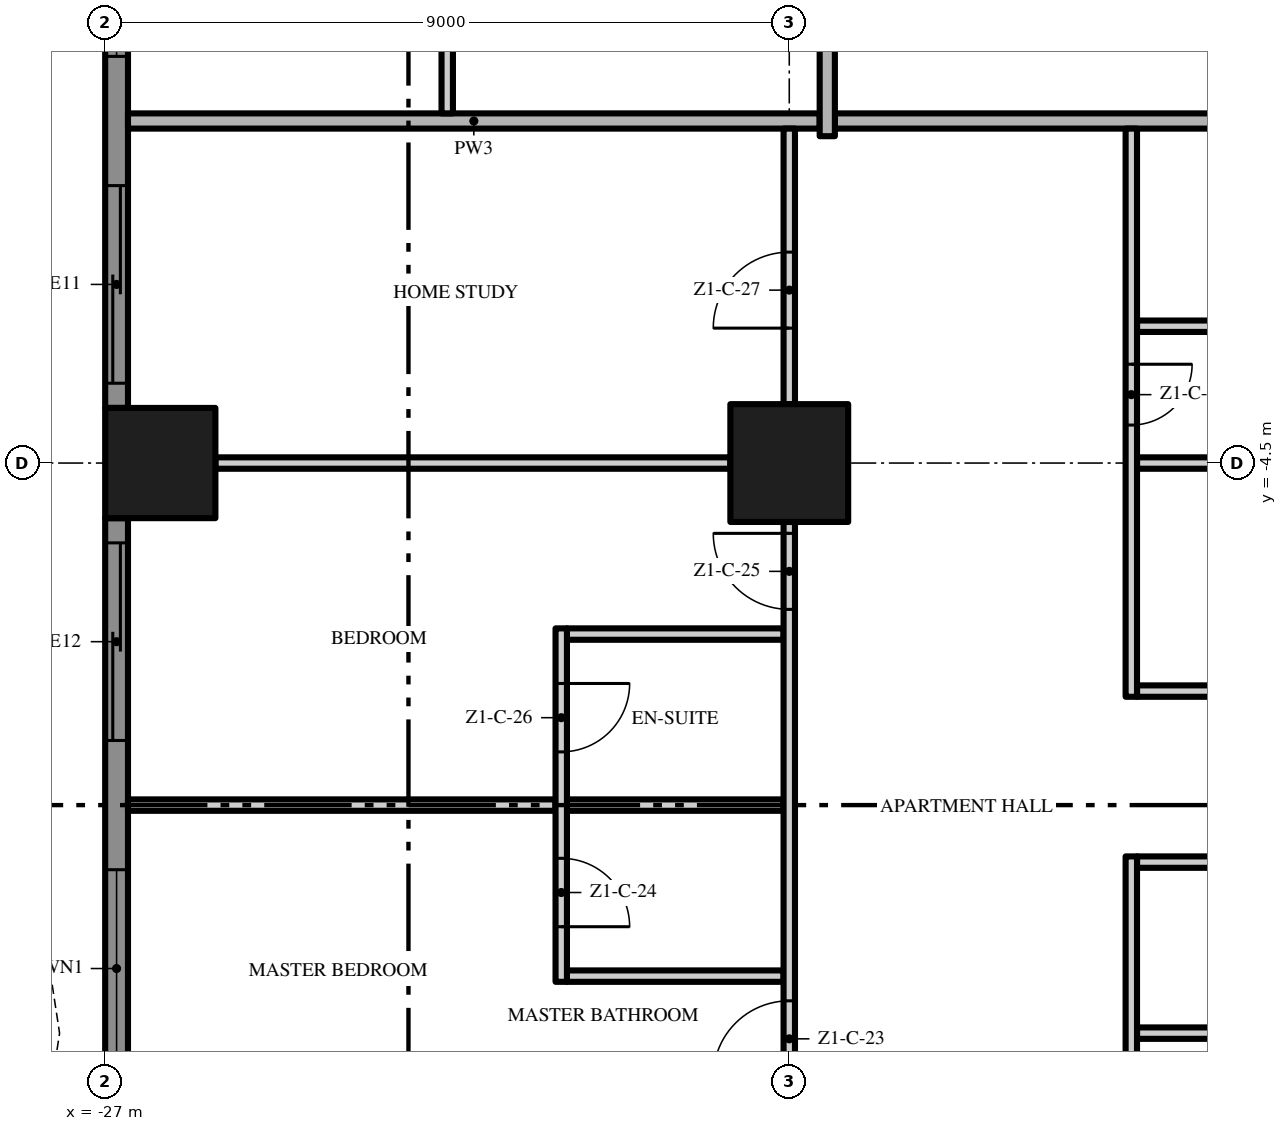
"""IFC4 building model, lengths in metres.
Left out: names, types, materials, properties, quantities, classifications, styles, units other than length and angle.
Written with IfcOpenShell. Run it as: python <this file> out.ifc"""

import sys

from ifc_helpers import new_model, si_unit, direction, frame, frame_2d, origin, origin_2d, place, context, subcontext, project, spatial, polyline, rectangle, outline, extrude, element, fill, save


model = new_model("IFC4")
c1 = context("Model", 3, precision=1e-05, world=origin(), true_north=direction((0.0, 1.0)))
c2 = subcontext(c1, "Body", "Model", "MODEL_VIEW")
j1 = project(units=[si_unit("LENGTHUNIT", "METRE"), si_unit("PLANEANGLEUNIT", "RADIAN")], contexts=[c1])
p1 = place(None, origin())
s1 = spatial("IfcSite", under=j1, at=p1, CompositionType="ELEMENT")
p2 = place(p1, origin())
s2 = spatial("IfcBuilding", under=s1, at=p2, CompositionType="ELEMENT")
p3 = place(p2, frame((0.0, 0.0, 37.8)))
s3 = spatial("IfcBuildingStorey", under=s2, at=p3, CompositionType="ELEMENT", Elevation=37.8)
p4 = place(p3, frame((-18.0, -4.5, 0.0), z_axis=(0.0, 0.0, 1.0), x_axis=(1.0, 0.0, 0.0)))
e1 = element("IfcColumn", 1, at=p4, inside=s3, PredefinedType="COLUMN", context=c2, shape_type="SweptSolid", body=[
    extrude(rectangle(XDim=1.55, YDim=1.55, at=origin_2d()), origin(), (0.0, 0.0, 1.0), 3.5),
])
p5 = place(p3, frame((-26.275, -4.5, 0.0), z_axis=(0.0, 0.0, 1.0), x_axis=(1.0, 0.0, 0.0)))
e2 = element("IfcColumn", 2, at=p5, inside=s3, PredefinedType="COLUMN", context=c2, shape_type="SweptSolid", body=[
    extrude(rectangle(XDim=1.45, YDim=1.45, at=origin_2d()), origin(), (0.0, 0.0, 1.0), 3.5),
])
p6 = place(p3, frame((-26.85, -3.775, 0.0), z_axis=(0.0, 0.0, 1.0), x_axis=(0.0, 1.0, 0.0)))
e3 = element("IfcWall", 3, at=p6, inside=s3, PredefinedType="SOLIDWALL", context=c2, shape_type="SweptSolid", body=[
    extrude(rectangle(XDim=7.55, YDim=0.3, at=frame_2d((3.775, 0.0))), origin(), (0.0, 0.0, 1.0), 3.5),
])
p7 = place(p6, frame((4.625, 0.0, 0.45)))
e4 = element("IfcOpeningElement", 4, at=p7, cuts=e3, PredefinedType="OPENING", context=c2, shape_type="SweptSolid", body=[
    extrude(rectangle(XDim=2.6, YDim=2.65, at=frame_2d((1.3, 1.325))), frame((0.0, 0.16, 0.0), z_axis=(0.0, -1.0, 0.0), x_axis=(1.0, 0.0, 0.0)), (0.0, 0.0, 1.0), 0.32),
])
p8 = place(p6, frame((0.325, 0.0, 0.0)))
e5 = element("IfcOpeningElement", 5, at=p8, cuts=e3, PredefinedType="OPENING", context=c2, shape_type="SweptSolid", body=[
    extrude(rectangle(XDim=2.6, YDim=2.4, at=frame_2d((1.3, 1.2))), frame((0.0, 0.16, 0.0), z_axis=(0.0, -1.0, 0.0), x_axis=(1.0, 0.0, 0.0)), (0.0, 0.0, 1.0), 0.32),
])
p9 = place(p3, frame((-26.85, -12.775, 0.0), z_axis=(0.0, 0.0, 1.0), x_axis=(0.0, 1.0, 0.0)))
e6 = element("IfcWall", 6, at=p9, inside=s3, PredefinedType="SOLIDWALL", context=c2, shape_type="SweptSolid", body=[
    extrude(rectangle(XDim=7.55, YDim=0.3, at=frame_2d((3.775, 0.0))), origin(), (0.0, 0.0, 1.0), 3.5),
])
p10 = place(p9, frame((4.625, 0.0, 0.0)))
e7 = element("IfcOpeningElement", 7, at=p10, cuts=e6, PredefinedType="OPENING", context=c2, shape_type="SweptSolid", body=[
    extrude(rectangle(XDim=2.6, YDim=2.4, at=frame_2d((1.3, 1.2))), frame((0.0, 0.16, 0.0), z_axis=(0.0, -1.0, 0.0), x_axis=(1.0, 0.0, 0.0)), (0.0, 0.0, 1.0), 0.32),
])
p11 = place(p9, frame((0.325, 0.0, 0.45)))
e8 = element("IfcOpeningElement", 8, at=p11, cuts=e6, PredefinedType="OPENING", context=c2, shape_type="SweptSolid", body=[
    extrude(rectangle(XDim=2.6, YDim=2.65, at=frame_2d((1.3, 1.325))), frame((0.0, 0.16, 0.0), z_axis=(0.0, -1.0, 0.0), x_axis=(1.0, 0.0, 0.0)), (0.0, 0.0, 1.0), 0.32),
])
p12 = place(p3, origin())
e9 = element("IfcWall", 9, at=p12, inside=s3, PredefinedType="USERDEFINED", context=c2, shape_type="SweptSolid", body=[
    extrude(outline(polyline([(-27.6, 18.0), (-27.829, 16.5), (-28.429, 15.0), (-29.171, 13.5), (-29.771, 12.0), (-30.0, 10.5), (-29.771, 9.0), (-29.171, 7.5), (-28.429, 6.0), (-27.829, 4.5), (-27.6, 3.0), (-27.829, 1.5), (-28.429, 0.0), (-29.171, -1.5), (-29.771, -3.0), (-30.0, -4.5), (-29.771, -6.0), (-29.171, -7.5), (-28.429, -9.0), (-27.829, -10.5), (-27.6, -12.0), (-27.829, -13.5), (-28.429, -15.0), (-29.171, -16.5), (-29.771, -18.0), (-29.539, -18.093), (-28.942, -16.602), (-28.201, -15.102), (-27.586, -13.566), (-27.347, -12.0), (-27.586, -10.434), (-28.201, -8.898), (-28.942, -7.398), (-29.528, -5.934), (-29.747, -4.5), (-29.528, -3.066), (-28.942, -1.602), (-28.201, -0.102), (-27.586, 1.434), (-27.347, 3.0), (-27.586, 4.566), (-28.201, 6.102), (-28.942, 7.602), (-29.528, 9.066), (-29.747, 10.5), (-29.528, 11.934), (-28.942, 13.398), (-28.201, 14.898), (-27.586, 16.434), (-27.353, 17.962), (-27.6, 18.0)])), origin(), (0.0, 0.0, 1.0), 0.9),
])
p13 = place(p3, frame((-13.425, -12.0, 0.0), z_axis=(0.0, 0.0, 1.0), x_axis=(1.0, 0.0, 0.0)))
e10 = element("IfcWall", 10, at=p13, inside=s3, PredefinedType="PARTITIONING", context=c2, shape_type="SweptSolid", body=[
    extrude(rectangle(XDim=4.35, YDim=0.15, at=frame_2d((2.175, 0.0))), origin(), (0.0, 0.0, 1.0), 3.5),
])
p14 = place(p3, frame((-20.925, -11.25, 0.0), z_axis=(0.0, 0.0, 1.0), x_axis=(1.0, 0.0, 0.0)))
e11 = element("IfcWall", 11, at=p14, inside=s3, PredefinedType="PARTITIONING", context=c2, shape_type="SweptSolid", body=[
    extrude(rectangle(XDim=2.85, YDim=0.15, at=frame_2d((1.425, 0.0))), origin(), (0.0, 0.0, 1.0), 3.5),
])
p15 = place(p3, frame((-9.075, -9.75, 0.0), z_axis=(0.0, 0.0, 1.0), x_axis=(-1.0, 0.0, 0.0)))
e12 = element("IfcWall", 12, at=p15, inside=s3, PredefinedType="PARTITIONING", context=c2, shape_type="SweptSolid", body=[
    extrude(rectangle(XDim=4.35, YDim=0.15, at=frame_2d((2.175, 0.0))), origin(), (0.0, 0.0, 1.0), 3.5),
])
p16 = place(p15, frame((1.7, 0.0, 0.0)))
e13 = element("IfcOpeningElement", 13, at=p16, cuts=e12, PredefinedType="OPENING", context=c2, shape_type="SweptSolid", body=[
    extrude(rectangle(XDim=0.9, YDim=2.1, at=frame_2d((0.45, 1.05))), frame((0.0, 0.085, 0.0), z_axis=(0.0, -1.0, 0.0), x_axis=(1.0, 0.0, 0.0)), (0.0, 0.0, 1.0), 0.17),
])
p17 = place(p3, frame((-26.7, -9.0, 0.0), z_axis=(0.0, 0.0, 1.0), x_axis=(1.0, 0.0, 0.0)))
e14 = element("IfcWall", 14, at=p17, inside=s3, PredefinedType="PARTITIONING", context=c2, shape_type="SweptSolid", body=[
    extrude(rectangle(XDim=5.625, YDim=0.15, at=frame_2d((2.812, 0.0))), origin(), (0.0, 0.0, 1.0), 3.5),
])
p18 = place(p3, frame((-20.925, -9.0, 0.0), z_axis=(0.0, 0.0, 1.0), x_axis=(1.0, 0.0, 0.0)))
e15 = element("IfcWall", 15, at=p18, inside=s3, PredefinedType="PARTITIONING", context=c2, shape_type="SweptSolid", body=[
    extrude(rectangle(XDim=2.85, YDim=0.15, at=frame_2d((1.425, 0.0))), origin(), (0.0, 0.0, 1.0), 3.5),
])
p19 = place(p3, frame((-13.425, -7.5, 0.0), z_axis=(0.0, 0.0, 1.0), x_axis=(1.0, 0.0, 0.0)))
e16 = element("IfcWall", 16, at=p19, inside=s3, PredefinedType="PARTITIONING", context=c2, shape_type="SweptSolid", body=[
    extrude(rectangle(XDim=4.35, YDim=0.15, at=frame_2d((2.175, 0.0))), origin(), (0.0, 0.0, 1.0), 3.5),
])
p20 = place(p3, frame((-20.925, -6.75, 0.0), z_axis=(0.0, 0.0, 1.0), x_axis=(1.0, 0.0, 0.0)))
e17 = element("IfcWall", 17, at=p20, inside=s3, PredefinedType="PARTITIONING", context=c2, shape_type="SweptSolid", body=[
    extrude(rectangle(XDim=2.85, YDim=0.15, at=frame_2d((1.425, 0.0))), origin(), (0.0, 0.0, 1.0), 3.5),
])
p21 = place(p3, frame((-25.55, -4.5, 0.0), z_axis=(0.0, 0.0, 1.0), x_axis=(1.0, 0.0, 0.0)))
e18 = element("IfcWall", 18, at=p21, inside=s3, PredefinedType="PARTITIONING", context=c2, shape_type="SweptSolid", body=[
    extrude(rectangle(XDim=6.775, YDim=0.15, at=frame_2d((3.388, 0.0))), origin(), (0.0, 0.0, 1.0), 3.5),
])
p22 = place(p3, frame((-13.425, -4.5, 0.0), z_axis=(0.0, 0.0, 1.0), x_axis=(1.0, 0.0, 0.0)))
e19 = element("IfcWall", 19, at=p22, inside=s3, PredefinedType="PARTITIONING", context=c2, shape_type="SweptSolid", body=[
    extrude(rectangle(XDim=3.65, YDim=0.15, at=frame_2d((1.825, 0.0))), origin(), (0.0, 0.0, 1.0), 3.5),
])
p23 = place(p3, frame((-13.425, -2.7, 0.0), z_axis=(0.0, 0.0, 1.0), x_axis=(1.0, 0.0, 0.0)))
e20 = element("IfcWall", 20, at=p23, inside=s3, PredefinedType="PARTITIONING", context=c2, shape_type="SweptSolid", body=[
    extrude(rectangle(XDim=4.35, YDim=0.15, at=frame_2d((2.175, 0.0))), origin(), (0.0, 0.0, 1.0), 3.5),
])
p24 = place(p3, frame((-17.4, 0.0, 0.0), z_axis=(0.0, 0.0, 1.0), x_axis=(1.0, 0.0, 0.0)))
e21 = element("IfcWall", 21, at=p24, inside=s3, PredefinedType="PARTITIONING", context=c2, shape_type="SweptSolid", body=[
    extrude(rectangle(XDim=12.8, YDim=0.2, at=frame_2d((6.4, 0.0))), origin(), (0.0, 0.0, 1.0), 3.5),
])
p25 = place(p3, frame((-26.7, 0.0, 0.0), z_axis=(0.0, 0.0, 1.0), x_axis=(1.0, 0.0, 0.0)))
e22 = element("IfcWall", 22, at=p25, inside=s3, PredefinedType="PARTITIONING", context=c2, shape_type="SweptSolid", body=[
    extrude(rectangle(XDim=9.1, YDim=0.2, at=frame_2d((4.55, 0.0))), origin(), (0.0, 0.0, 1.0), 3.5),
])
p26 = place(p3, frame((-22.5, 0.1, 0.0), z_axis=(0.0, 0.0, 1.0), x_axis=(0.0, 1.0, 0.0)))
e23 = element("IfcWall", 23, at=p26, inside=s3, PredefinedType="PARTITIONING", context=c2, shape_type="SweptSolid", body=[
    extrude(rectangle(XDim=17.175, YDim=0.15, at=frame_2d((8.588, 0.0))), origin(), (0.0, 0.0, 1.0), 3.5),
])
p27 = place(p26, frame((1.65, 0.0, 0.0)))
e24 = element("IfcOpeningElement", 24, at=p27, cuts=e23, PredefinedType="OPENING", context=c2, shape_type="SweptSolid", body=[
    extrude(rectangle(XDim=1.0, YDim=2.4, at=frame_2d((0.5, 1.2))), frame((0.0, 0.085, 0.0), z_axis=(0.0, -1.0, 0.0), x_axis=(1.0, 0.0, 0.0)), (0.0, 0.0, 1.0), 0.17),
])
p28 = place(p26, frame((8.0, 0.0, 0.0)))
e25 = element("IfcOpeningElement", 25, at=p28, cuts=e23, PredefinedType="OPENING", context=c2, shape_type="SweptSolid", body=[
    extrude(rectangle(XDim=1.8, YDim=2.4, at=frame_2d((0.9, 1.2))), frame((0.0, 0.085, 0.0), z_axis=(0.0, -1.0, 0.0), x_axis=(1.0, 0.0, 0.0)), (0.0, 0.0, 1.0), 0.17),
])
p29 = place(p26, frame((16.025, 0.0, 0.0)))
e26 = element("IfcOpeningElement", 26, at=p29, cuts=e23, PredefinedType="OPENING", context=c2, shape_type="SweptSolid", body=[
    extrude(rectangle(XDim=1.0, YDim=2.4, at=frame_2d((0.5, 1.2))), frame((0.0, 0.085, 0.0), z_axis=(0.0, -1.0, 0.0), x_axis=(1.0, 0.0, 0.0)), (0.0, 0.0, 1.0), 0.17),
])
p30 = place(p3, frame((-21.0, -6.675, 0.0), z_axis=(0.0, 0.0, 1.0), x_axis=(0.0, -1.0, 0.0)))
e27 = element("IfcWall", 27, at=p30, inside=s3, PredefinedType="PARTITIONING", context=c2, shape_type="SweptSolid", body=[
    extrude(rectangle(XDim=4.65, YDim=0.15, at=frame_2d((2.325, 0.0))), origin(), (0.0, 0.0, 1.0), 3.5),
])
p31 = place(p30, frame((3.025, 0.0, 0.0)))
e28 = element("IfcOpeningElement", 28, at=p31, cuts=e27, PredefinedType="OPENING", context=c2, shape_type="SweptSolid", body=[
    extrude(rectangle(XDim=0.9, YDim=2.1, at=frame_2d((0.45, 1.05))), frame((0.0, 0.085, 0.0), z_axis=(0.0, -1.0, 0.0), x_axis=(1.0, 0.0, 0.0)), (0.0, 0.0, 1.0), 0.17),
])
p32 = place(p30, frame((0.725, 0.0, 0.0)))
e29 = element("IfcOpeningElement", 29, at=p32, cuts=e27, PredefinedType="OPENING", context=c2, shape_type="SweptSolid", body=[
    extrude(rectangle(XDim=0.9, YDim=2.1, at=frame_2d((0.45, 1.05))), frame((0.0, 0.085, 0.0), z_axis=(0.0, -1.0, 0.0), x_axis=(1.0, 0.0, 0.0)), (0.0, 0.0, 1.0), 0.17),
])
p33 = place(p3, frame((-18.0, -12.725, 0.0), z_axis=(0.0, 0.0, 1.0), x_axis=(0.0, 1.0, 0.0)))
e30 = element("IfcWall", 30, at=p33, inside=s3, PredefinedType="PARTITIONING", context=c2, shape_type="SweptSolid", body=[
    extrude(rectangle(XDim=7.45, YDim=0.15, at=frame_2d((3.725, 0.0))), origin(), (0.0, 0.0, 1.0), 3.5),
])
p34 = place(p33, frame((0.15, 0.0, 0.0)))
e31 = element("IfcOpeningElement", 31, at=p34, cuts=e30, PredefinedType="OPENING", context=c2, shape_type="SweptSolid", body=[
    extrude(rectangle(XDim=1.0, YDim=2.4, at=frame_2d((0.5, 1.2))), frame((0.0, 0.085, 0.0), z_axis=(0.0, -1.0, 0.0), x_axis=(1.0, 0.0, 0.0)), (0.0, 0.0, 1.0), 0.17),
])
p35 = place(p33, frame((6.3, 0.0, 0.0)))
e32 = element("IfcOpeningElement", 32, at=p35, cuts=e30, PredefinedType="OPENING", context=c2, shape_type="SweptSolid", body=[
    extrude(rectangle(XDim=1.0, YDim=2.4, at=frame_2d((0.5, 1.2))), frame((0.0, 0.085, 0.0), z_axis=(0.0, -1.0, 0.0), x_axis=(1.0, 0.0, 0.0)), (0.0, 0.0, 1.0), 0.17),
])
p36 = place(p3, frame((-18.0, -3.725, 0.0), z_axis=(0.0, 0.0, 1.0), x_axis=(0.0, 1.0, 0.0)))
e33 = element("IfcWall", 33, at=p36, inside=s3, PredefinedType="PARTITIONING", context=c2, shape_type="SweptSolid", body=[
    extrude(rectangle(XDim=3.625, YDim=0.15, at=frame_2d((1.812, 0.0))), origin(), (0.0, 0.0, 1.0), 3.5),
])
p37 = place(p36, frame((1.0, 0.0, 0.0)))
e34 = element("IfcOpeningElement", 34, at=p37, cuts=e33, PredefinedType="OPENING", context=c2, shape_type="SweptSolid", body=[
    extrude(rectangle(XDim=1.0, YDim=2.4, at=frame_2d((0.5, 1.2))), frame((0.0, 0.085, 0.0), z_axis=(0.0, -1.0, 0.0), x_axis=(1.0, 0.0, 0.0)), (0.0, 0.0, 1.0), 0.17),
])
p38 = place(p3, frame((-17.5, -0.2, 0.0), z_axis=(0.0, 0.0, 1.0), x_axis=(0.0, 1.0, 0.0)))
e35 = element("IfcWall", 35, at=p38, inside=s3, PredefinedType="PARTITIONING", context=c2, shape_type="SweptSolid", body=[
    extrude(rectangle(XDim=3.925, YDim=0.2, at=frame_2d((1.962, 0.0))), origin(), (0.0, 0.0, 1.0), 3.5),
])
p39 = place(p3, frame((-13.5, -9.675, 0.0), z_axis=(0.0, 0.0, 1.0), x_axis=(0.0, -1.0, 0.0)))
e36 = element("IfcWall", 36, at=p39, inside=s3, PredefinedType="PARTITIONING", context=c2, shape_type="SweptSolid", body=[
    extrude(rectangle(XDim=12.525, YDim=0.15, at=frame_2d((6.263, 0.0))), origin(), (0.0, 0.0, 1.0), 3.5),
])
p40 = place(p39, frame((11.175, 0.0, 0.0)))
e37 = element("IfcOpeningElement", 37, at=p40, cuts=e36, PredefinedType="OPENING", context=c2, shape_type="SweptSolid", body=[
    extrude(rectangle(XDim=0.8, YDim=2.0, at=frame_2d((0.4, 1.0))), frame((0.0, 0.085, 0.0), z_axis=(0.0, -1.0, 0.0), x_axis=(1.0, 0.0, 0.0)), (0.0, 0.0, 1.0), 0.17),
])
p41 = place(p39, frame((4.825, 0.0, 0.0)))
e38 = element("IfcOpeningElement", 38, at=p41, cuts=e36, PredefinedType="OPENING", context=c2, shape_type="SweptSolid", body=[
    extrude(rectangle(XDim=1.0, YDim=2.4, at=frame_2d((0.5, 1.2))), frame((0.0, 0.085, 0.0), z_axis=(0.0, -1.0, 0.0), x_axis=(1.0, 0.0, 0.0)), (0.0, 0.0, 1.0), 0.17),
])
p42 = place(p3, frame((-13.5, -0.1, 0.0), z_axis=(0.0, 0.0, 1.0), x_axis=(0.0, -1.0, 0.0)))
e39 = element("IfcWall", 39, at=p42, inside=s3, PredefinedType="PARTITIONING", context=c2, shape_type="SweptSolid", body=[
    extrude(rectangle(XDim=7.475, YDim=0.15, at=frame_2d((3.737, 0.0))), origin(), (0.0, 0.0, 1.0), 3.5),
])
p43 = place(p42, frame((3.1, 0.0, 0.0)))
e40 = element("IfcOpeningElement", 40, at=p43, cuts=e39, PredefinedType="OPENING", context=c2, shape_type="SweptSolid", body=[
    extrude(rectangle(XDim=0.8, YDim=2.0, at=frame_2d((0.4, 1.0))), frame((0.0, 0.085, 0.0), z_axis=(0.0, -1.0, 0.0), x_axis=(1.0, 0.0, 0.0)), (0.0, 0.0, 1.0), 0.17),
])
p44 = place(p7, origin())
e41 = element("IfcWindow", 41, at=p44, inside=s3, PartitioningType="SINGLE_PANEL", PredefinedType="WINDOW", context=c2, shape_type="SweptSolid", body=[
    extrude(rectangle(XDim=2.6, YDim=2.65, at=frame_2d((1.3, 1.325))), frame((0.0, 0.03, 0.0), z_axis=(0.0, -1.0, 0.0), x_axis=(1.0, 0.0, 0.0)), (0.0, 0.0, 1.0), 0.06),
])
fill(e4, e41)
p45 = place(p8, origin())
e42 = element("IfcDoor", 42, at=p45, inside=s3, OperationType="SINGLE_SWING_LEFT", PredefinedType="DOOR", context=c2, shape_type="SweptSolid", body=[
    extrude(rectangle(XDim=2.6, YDim=2.4, at=frame_2d((1.3, 1.2))), frame((0.0, 0.025, 0.0), z_axis=(0.0, -1.0, 0.0), x_axis=(1.0, 0.0, 0.0)), (0.0, 0.0, 1.0), 0.05),
])
fill(e5, e42)
p46 = place(p10, origin())
e43 = element("IfcDoor", 43, at=p46, inside=s3, OperationType="SINGLE_SWING_LEFT", PredefinedType="DOOR", context=c2, shape_type="SweptSolid", body=[
    extrude(rectangle(XDim=2.6, YDim=2.4, at=frame_2d((1.3, 1.2))), frame((0.0, 0.025, 0.0), z_axis=(0.0, -1.0, 0.0), x_axis=(1.0, 0.0, 0.0)), (0.0, 0.0, 1.0), 0.05),
])
fill(e7, e43)
p47 = place(p11, origin())
e44 = element("IfcWindow", 44, at=p47, inside=s3, PartitioningType="SINGLE_PANEL", PredefinedType="WINDOW", context=c2, shape_type="SweptSolid", body=[
    extrude(rectangle(XDim=2.6, YDim=2.65, at=frame_2d((1.3, 1.325))), frame((0.0, 0.03, 0.0), z_axis=(0.0, -1.0, 0.0), x_axis=(1.0, 0.0, 0.0)), (0.0, 0.0, 1.0), 0.06),
])
fill(e8, e44)
p48 = place(p43, origin())
e45 = element("IfcDoor", 45, at=p48, inside=s3, OperationType="SINGLE_SWING_LEFT", PredefinedType="DOOR", context=c2, shape_type="SweptSolid", body=[
    extrude(rectangle(XDim=0.8, YDim=2.0, at=frame_2d((0.4, 1.0))), frame((0.0, 0.025, 0.0), z_axis=(0.0, -1.0, 0.0), x_axis=(1.0, 0.0, 0.0)), (0.0, 0.0, 1.0), 0.05),
])
fill(e40, e45)
p49 = place(p34, origin())
e46 = element("IfcDoor", 46, at=p49, inside=s3, OperationType="SINGLE_SWING_LEFT", PredefinedType="DOOR", context=c2, shape_type="SweptSolid", body=[
    extrude(rectangle(XDim=1.0, YDim=2.4, at=frame_2d((0.5, 1.2))), frame((0.0, 0.025, 0.0), z_axis=(0.0, -1.0, 0.0), x_axis=(1.0, 0.0, 0.0)), (0.0, 0.0, 1.0), 0.05),
])
fill(e31, e46)
p50 = place(p31, origin())
e47 = element("IfcDoor", 47, at=p50, inside=s3, OperationType="SINGLE_SWING_RIGHT", PredefinedType="DOOR", context=c2, shape_type="SweptSolid", body=[
    extrude(rectangle(XDim=0.9, YDim=2.1, at=frame_2d((0.45, 1.05))), frame((0.0, 0.025, 0.0), z_axis=(0.0, -1.0, 0.0), x_axis=(1.0, 0.0, 0.0)), (0.0, 0.0, 1.0), 0.05),
])
fill(e28, e47)
p51 = place(p35, origin())
e48 = element("IfcDoor", 48, at=p51, inside=s3, OperationType="SINGLE_SWING_RIGHT", PredefinedType="DOOR", context=c2, shape_type="SweptSolid", body=[
    extrude(rectangle(XDim=1.0, YDim=2.4, at=frame_2d((0.5, 1.2))), frame((0.0, 0.025, 0.0), z_axis=(0.0, -1.0, 0.0), x_axis=(1.0, 0.0, 0.0)), (0.0, 0.0, 1.0), 0.05),
])
fill(e32, e48)
p52 = place(p32, origin())
e49 = element("IfcDoor", 49, at=p52, inside=s3, OperationType="SINGLE_SWING_LEFT", PredefinedType="DOOR", context=c2, shape_type="SweptSolid", body=[
    extrude(rectangle(XDim=0.9, YDim=2.1, at=frame_2d((0.45, 1.05))), frame((0.0, 0.025, 0.0), z_axis=(0.0, -1.0, 0.0), x_axis=(1.0, 0.0, 0.0)), (0.0, 0.0, 1.0), 0.05),
])
fill(e29, e49)
p53 = place(p37, origin())
e50 = element("IfcDoor", 50, at=p53, inside=s3, OperationType="SINGLE_SWING_LEFT", PredefinedType="DOOR", context=c2, shape_type="SweptSolid", body=[
    extrude(rectangle(XDim=1.0, YDim=2.4, at=frame_2d((0.5, 1.2))), frame((0.0, 0.025, 0.0), z_axis=(0.0, -1.0, 0.0), x_axis=(1.0, 0.0, 0.0)), (0.0, 0.0, 1.0), 0.05),
])
fill(e34, e50)
save(model, sys.argv[1])
